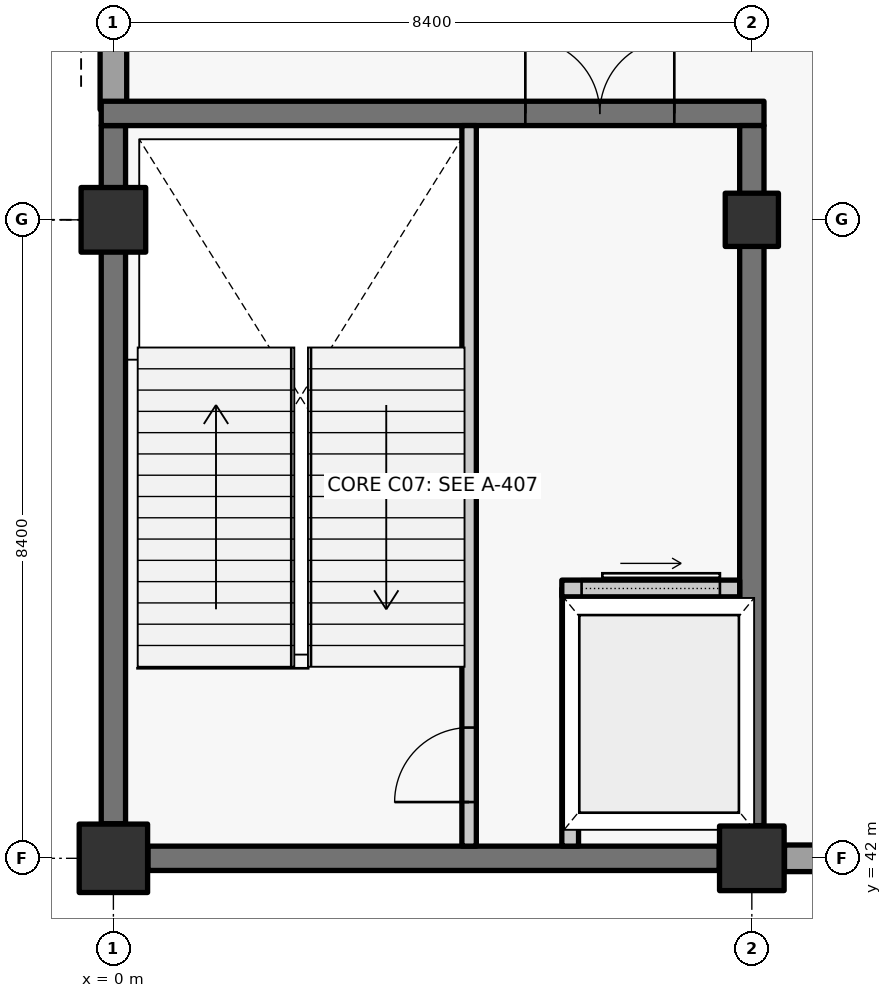
"""IFC4 building model, lengths in metres.
Left out: names, types, materials, properties, quantities, classifications, styles, units other than length and angle.
Written with IfcOpenShell. Run it as: python <this file> out.ifc"""

import sys

from ifc_helpers import new_model, si_unit, direction, frame, frame_2d, origin, origin_2d, place, context, subcontext, project, spatial, rectangle, extrude, element, fill, save


model = new_model("IFC4")
c1 = context("Model", 3, precision=1e-05, world=origin(), true_north=direction((0.0, 1.0)))
c2 = subcontext(c1, "Body", "Model", "MODEL_VIEW")
j1 = project(units=[si_unit("LENGTHUNIT", "METRE"), si_unit("PLANEANGLEUNIT", "RADIAN")], contexts=[c1])
p1 = place(None, origin())
s1 = spatial("IfcSite", under=j1, at=p1, CompositionType="ELEMENT")
p2 = place(p1, origin())
s2 = spatial("IfcBuilding", under=s1, at=p2, CompositionType="ELEMENT")
p3 = place(p2, frame((0.0, 0.0, 6.0)))
s3 = spatial("IfcBuildingStorey", under=s2, at=p3, CompositionType="ELEMENT", Elevation=6.0)
p4 = place(p3, frame((0.0, 42.0, 0.0), z_axis=(0.0, 0.0, 1.0), x_axis=(1.0, 0.0, 0.0)))
e1 = element("IfcColumn", 1, at=p4, inside=s3, PredefinedType="COLUMN", context=c2, shape_type="SweptSolid", body=[
    extrude(rectangle(XDim=0.9, YDim=0.9, at=origin_2d()), origin(), (0.0, 0.0, 1.0), 5.4),
])
for number, where, z_axis, x_axis in (
    (2, (0.0, 50.4, 0.0), (0.0, 0.0, 1.0), (1.0, 0.0, 0.0)),
    (3, (8.4, 42.0, 0.0), (0.0, 0.0, 1.0), (1.0, 0.0, 0.0)),
):
    element("IfcColumn", number, at=place(p3, frame(where, z_axis=z_axis, x_axis=x_axis)), inside=s3, PredefinedType="COLUMN", context=c2, shape_type="SweptSolid", body=[
        extrude(rectangle(XDim=0.85, YDim=0.85, at=origin_2d()), origin(), (0.0, 0.0, 1.0), 5.4),
    ])
p5 = place(p3, frame((8.4, 50.4, 0.0), z_axis=(0.0, 0.0, 1.0), x_axis=(1.0, 0.0, 0.0)))
e4 = element("IfcColumn", 4, at=p5, inside=s3, PredefinedType="COLUMN", context=c2, shape_type="SweptSolid", body=[
    extrude(rectangle(XDim=0.7, YDim=0.7, at=origin_2d()), origin(), (0.0, 0.0, 1.0), 5.4),
])
p6 = place(p3, frame((0.0, 51.85, 0.0), z_axis=(0.0, 0.0, 1.0), x_axis=(0.0, 1.0, 0.0)))
e5 = element("IfcWall", 5, at=p6, inside=s3, PredefinedType="SOLIDWALL", context=c2, shape_type="SweptSolid", body=[
    extrude(rectangle(XDim=6.52, YDim=0.35, at=frame_2d((3.26, 0.0))), origin(), (0.0, 0.0, 1.0), 4.73),
])
p7 = place(p6, frame((1.635, 0.0, 1.35)))
e6 = element("IfcOpeningElement", 6, at=p7, cuts=e5, PredefinedType="OPENING", context=c2, shape_type="SweptSolid", body=[
    extrude(rectangle(XDim=3.2, YDim=1.3, at=frame_2d((1.6, 0.65))), frame((0.0, 0.185, 0.0), z_axis=(0.0, -1.0, 0.0), x_axis=(1.0, 0.0, 0.0)), (0.0, 0.0, 1.0), 0.37),
])
p8 = place(p3, frame((16.37, 42.0, 0.0), z_axis=(0.0, 0.0, 1.0), x_axis=(-1.0, 0.0, 0.0)))
e7 = element("IfcWall", 7, at=p8, inside=s3, PredefinedType="SOLIDWALL", context=c2, shape_type="SweptSolid", body=[
    extrude(rectangle(XDim=7.54, YDim=0.35, at=frame_2d((3.77, 0.0))), origin(), (0.0, 0.0, 1.0), 4.68),
])
p9 = place(p8, frame((3.17, 0.0, 1.1)))
e8 = element("IfcOpeningElement", 8, at=p9, cuts=e7, PredefinedType="OPENING", context=c2, shape_type="SweptSolid", body=[
    extrude(rectangle(XDim=1.2, YDim=1.8, at=frame_2d((0.6, 0.9))), frame((0.0, 0.185, 0.0), z_axis=(0.0, -1.0, 0.0), x_axis=(1.0, 0.0, 0.0)), (0.0, 0.0, 1.0), 0.37),
])
p10 = place(p3, frame((7.97, 42.0, 0.0), z_axis=(0.0, 0.0, 1.0), x_axis=(-1.0, 0.0, 0.0)))
e9 = element("IfcWall", 9, at=p10, inside=s3, PredefinedType="SHEAR", context=c2, shape_type="SweptSolid", body=[
    extrude(rectangle(XDim=7.515, YDim=0.32, at=frame_2d((3.757, 0.0))), origin(), (0.0, 0.0, 1.0), 5.12),
])
p11 = place(p3, frame((0.0, 42.455, 0.0), z_axis=(0.0, 0.0, 1.0), x_axis=(0.0, 1.0, 0.0)))
e10 = element("IfcWall", 10, at=p11, inside=s3, PredefinedType="SHEAR", context=c2, shape_type="SweptSolid", body=[
    extrude(rectangle(XDim=9.185, YDim=0.32, at=frame_2d((4.592, 0.0))), origin(), (0.0, 0.0, 1.0), 5.12),
])
p12 = place(p3, frame((-0.16, 51.8, 0.0), z_axis=(0.0, 0.0, 1.0), x_axis=(1.0, 0.0, 0.0)))
e11 = element("IfcWall", 11, at=p12, inside=s3, PredefinedType="SHEAR", context=c2, shape_type="SweptSolid", body=[
    extrude(rectangle(XDim=8.72, YDim=0.32, at=frame_2d((4.36, 0.0))), origin(), (0.0, 0.0, 1.0), 5.12),
])
p13 = place(p12, frame((5.58, 0.0, 0.0)))
e12 = element("IfcOpeningElement", 12, at=p13, cuts=e11, PredefinedType="OPENING", context=c2, shape_type="SweptSolid", body=[
    extrude(rectangle(XDim=1.96, YDim=2.2, at=frame_2d((0.98, 1.1))), frame((0.0, 0.17, 0.0), z_axis=(0.0, -1.0, 0.0), x_axis=(1.0, 0.0, 0.0)), (0.0, 0.0, 1.0), 0.34),
])
p14 = place(p3, frame((8.4, 51.64, 0.0), z_axis=(0.0, 0.0, 1.0), x_axis=(0.0, -1.0, 0.0)))
e13 = element("IfcWall", 13, at=p14, inside=s3, PredefinedType="SHEAR", context=c2, shape_type="SweptSolid", body=[
    extrude(rectangle(XDim=9.21, YDim=0.32, at=frame_2d((4.605, 0.0))), origin(), (0.0, 0.0, 1.0), 5.12),
])
p15 = place(p3, frame((4.68, 42.16, 0.0), z_axis=(0.0, 0.0, 1.0), x_axis=(0.0, 1.0, 0.0)))
e14 = element("IfcWall", 14, at=p15, inside=s3, PredefinedType="SOLIDWALL", context=c2, shape_type="SweptSolid", body=[
    extrude(rectangle(XDim=9.48, YDim=0.19, at=frame_2d((4.74, 0.0))), origin(), (0.0, 0.0, 1.0), 5.12),
])
p16 = place(p15, frame((0.58, 0.0, 0.0)))
e15 = element("IfcOpeningElement", 15, at=p16, cuts=e14, PredefinedType="OPENING", context=c2, shape_type="SweptSolid", body=[
    extrude(rectangle(XDim=0.98, YDim=2.15, at=frame_2d((0.49, 1.075))), frame((0.0, 0.105, 0.0), z_axis=(0.0, -1.0, 0.0), x_axis=(1.0, 0.0, 0.0)), (0.0, 0.0, 1.0), 0.21),
])
p17 = place(p3, frame((6.01, 42.16, 0.0), z_axis=(0.0, 0.0, 1.0), x_axis=(0.0, 1.0, 0.0)))
e16 = element("IfcWall", 16, at=p17, inside=s3, PredefinedType="SOLIDWALL", context=c2, shape_type="SweptSolid", body=[
    extrude(rectangle(XDim=3.39, YDim=0.22, at=frame_2d((1.695, 0.0))), origin(), (0.0, 0.0, 1.0), 5.12),
])
p18 = place(p3, frame((5.9, 45.55, 0.0), z_axis=(0.0, 0.0, 1.0), x_axis=(1.0, 0.0, 0.0)))
e17 = element("IfcWall", 17, at=p18, inside=s3, PredefinedType="SOLIDWALL", context=c2, shape_type="SweptSolid", body=[
    extrude(rectangle(XDim=2.34, YDim=0.22, at=frame_2d((1.17, 0.0))), origin(), (0.0, 0.0, 1.0), 5.12),
])
p19 = place(p18, frame((0.26, 0.0, 0.0)))
e18 = element("IfcOpeningElement", 18, at=p19, cuts=e17, PredefinedType="OPENING", context=c2, shape_type="SweptSolid", body=[
    extrude(rectangle(XDim=1.82, YDim=2.4, at=frame_2d((0.91, 1.2))), frame((0.0, 0.12, 0.0), z_axis=(0.0, -1.0, 0.0), x_axis=(1.0, 0.0, 0.0)), (0.0, 0.0, 1.0), 0.24),
])
p20 = place(p16, origin())
e19 = element("IfcDoor", 19, at=p20, inside=s3, OperationType="SINGLE_SWING_LEFT", PredefinedType="DOOR", context=c2, shape_type="SweptSolid", body=[
    extrude(rectangle(XDim=0.98, YDim=2.15, at=frame_2d((0.49, 1.075))), frame((0.0, 0.025, 0.0), z_axis=(0.0, -1.0, 0.0), x_axis=(1.0, 0.0, 0.0)), (0.0, 0.0, 1.0), 0.05),
])
fill(e15, e19)
p21 = place(p13, origin())
e20 = element("IfcDoor", 20, at=p21, inside=s3, OperationType="DOUBLE_DOOR_SINGLE_SWING", PredefinedType="DOOR", context=c2, shape_type="SweptSolid", body=[
    extrude(rectangle(XDim=1.96, YDim=2.2, at=frame_2d((0.98, 1.1))), frame((0.0, 0.025, 0.0), z_axis=(0.0, -1.0, 0.0), x_axis=(1.0, 0.0, 0.0)), (0.0, 0.0, 1.0), 0.05),
])
fill(e12, e20)
p22 = place(p19, origin())
e21 = element("IfcDoor", 21, at=p22, inside=s3, OperationType="SLIDING_TO_RIGHT", PredefinedType="DOOR", context=c2, shape_type="SweptSolid", body=[
    extrude(rectangle(XDim=1.82, YDim=2.4, at=frame_2d((0.91, 1.2))), frame((0.0, 0.025, 0.0), z_axis=(0.0, -1.0, 0.0), x_axis=(1.0, 0.0, 0.0)), (0.0, 0.0, 1.0), 0.05),
])
fill(e18, e21)
save(model, sys.argv[1])
